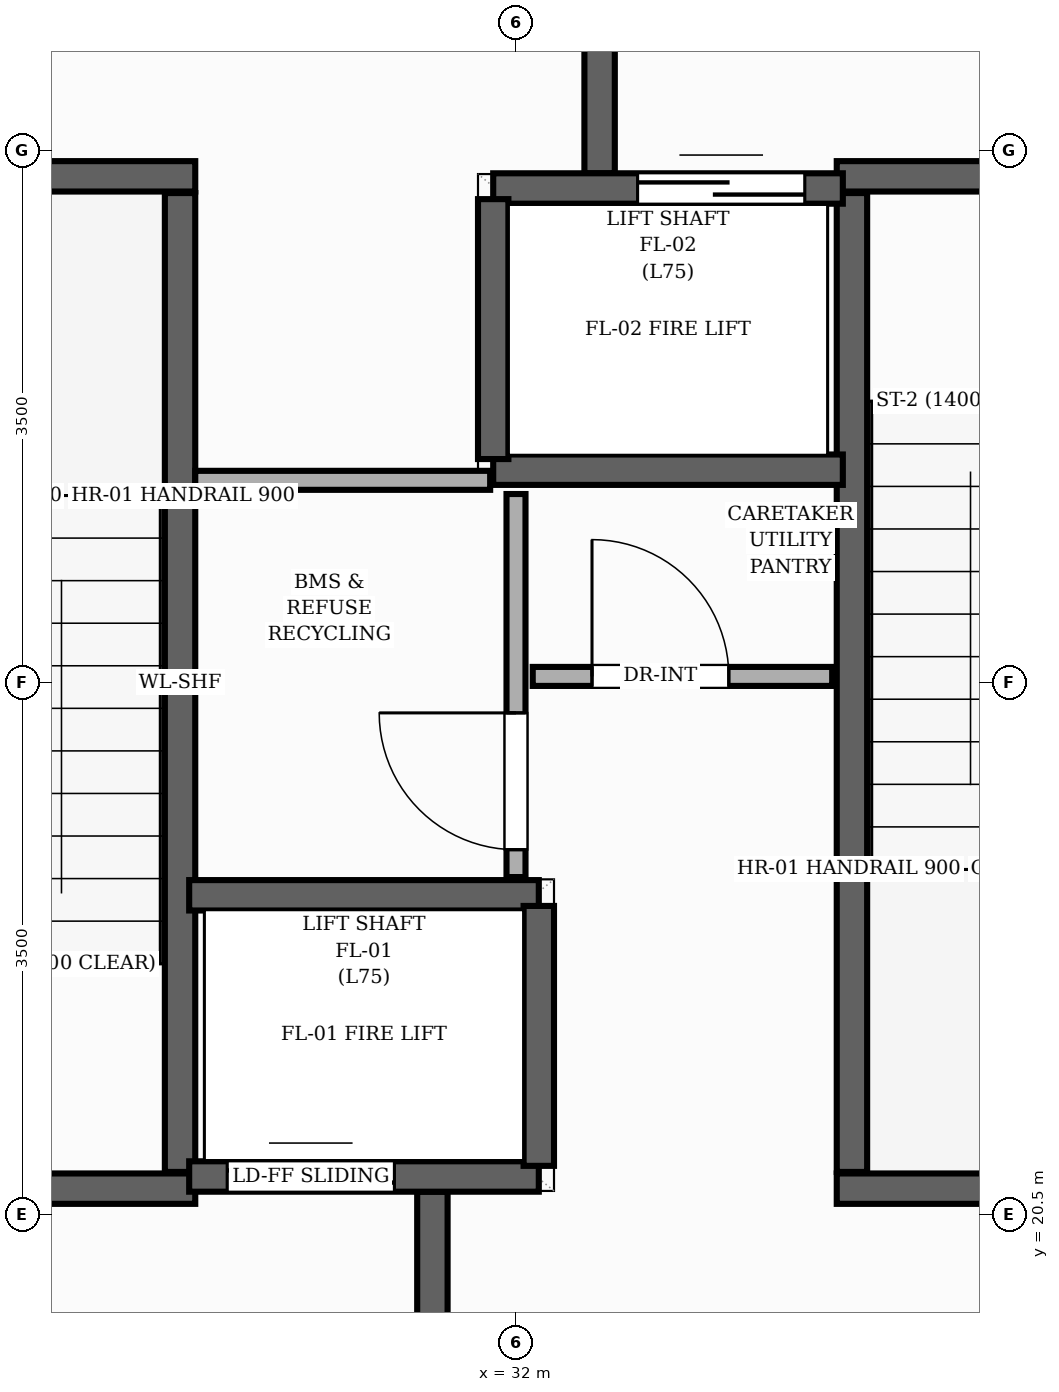
"""IFC4 building model, lengths in metres.
Left out: names, types, materials, properties, quantities, classifications, styles, units other than length and angle.
Written with IfcOpenShell. Run it as: python <this file> out.ifc"""

import sys

from ifc_helpers import new_model, si_unit, direction, frame, frame_2d, origin, place, context, subcontext, project, spatial, rectangle, extrude, element, fill, save


model = new_model("IFC4")
c1 = context("Model", 3, precision=1e-05, world=origin(), true_north=direction((0.0, 1.0)))
c2 = subcontext(c1, "Body", "Model", "MODEL_VIEW")
j1 = project(units=[si_unit("LENGTHUNIT", "METRE"), si_unit("PLANEANGLEUNIT", "RADIAN")], contexts=[c1])
p1 = place(None, origin())
s1 = spatial("IfcSite", under=j1, at=p1, CompositionType="ELEMENT")
p2 = place(p1, origin())
s2 = spatial("IfcBuilding", under=s1, at=p2, CompositionType="ELEMENT")
p3 = place(p2, frame((0.0, 0.0, 251.04)))
s3 = spatial("IfcBuildingStorey", under=s2, at=p3, CompositionType="ELEMENT", Elevation=251.04)
p4 = place(p3, frame((29.79, 20.78, 0.0), z_axis=(0.0, 0.0, 1.0), x_axis=(0.0, 1.0, 0.0)))
e1 = element("IfcWall", 1, at=p4, inside=s3, PredefinedType="SHEAR", context=c2, shape_type="SweptSolid", body=[
    extrude(rectangle(XDim=6.44, YDim=0.2, at=frame_2d((3.22, 0.0))), origin(), (0.0, 0.0, 1.0), 4.16),
])
p5 = place(p3, frame((26.65, 27.33, 0.0), z_axis=(0.0, 0.0, 1.0), x_axis=(1.0, 0.0, 0.0)))
e2 = element("IfcWall", 2, at=p5, inside=s3, PredefinedType="SHEAR", context=c2, shape_type="SweptSolid", body=[
    extrude(rectangle(XDim=3.24, YDim=0.2, at=frame_2d((1.62, 0.0))), origin(), (0.0, 0.0, 1.0), 4.16),
])
p6 = place(p3, frame((26.65, 20.67, 0.0), z_axis=(0.0, 0.0, 1.0), x_axis=(1.0, 0.0, 0.0)))
e3 = element("IfcWall", 3, at=p6, inside=s3, PredefinedType="SHEAR", context=c2, shape_type="SweptSolid", body=[
    extrude(rectangle(XDim=3.24, YDim=0.2, at=frame_2d((1.62, 0.0))), origin(), (0.0, 0.0, 1.0), 4.16),
])
p7 = place(p6, frame((1.055, 0.0, 0.0)))
e4 = element("IfcOpeningElement", 4, at=p7, cuts=e3, PredefinedType="OPENING", context=c2, shape_type="SweptSolid", body=[
    extrude(rectangle(XDim=1.05, YDim=2.15, at=frame_2d((0.525, 1.075))), frame((0.0, 0.11, 0.0), z_axis=(0.0, -1.0, 0.0), x_axis=(1.0, 0.0, 0.0)), (0.0, 0.0, 1.0), 0.22),
])
p8 = place(p3, frame((34.21, 20.78, 0.0), z_axis=(0.0, 0.0, 1.0), x_axis=(0.0, 1.0, 0.0)))
e5 = element("IfcWall", 5, at=p8, inside=s3, PredefinedType="SHEAR", context=c2, shape_type="SweptSolid", body=[
    extrude(rectangle(XDim=6.44, YDim=0.2, at=frame_2d((3.22, 0.0))), origin(), (0.0, 0.0, 1.0), 4.16),
])
p9 = place(p3, frame((34.11, 20.67, 0.0), z_axis=(0.0, 0.0, 1.0), x_axis=(1.0, 0.0, 0.0)))
e6 = element("IfcWall", 6, at=p9, inside=s3, PredefinedType="SHEAR", context=c2, shape_type="SweptSolid", body=[
    extrude(rectangle(XDim=3.24, YDim=0.2, at=frame_2d((1.62, 0.0))), origin(), (0.0, 0.0, 1.0), 4.16),
])
p10 = place(p3, frame((34.11, 27.33, 0.0), z_axis=(0.0, 0.0, 1.0), x_axis=(1.0, 0.0, 0.0)))
e7 = element("IfcWall", 7, at=p10, inside=s3, PredefinedType="SHEAR", context=c2, shape_type="SweptSolid", body=[
    extrude(rectangle(XDim=3.24, YDim=0.2, at=frame_2d((1.62, 0.0))), origin(), (0.0, 0.0, 1.0), 4.16),
])
p11 = place(p10, frame((1.135, 0.0, 0.0)))
e8 = element("IfcOpeningElement", 8, at=p11, cuts=e7, PredefinedType="OPENING", context=c2, shape_type="SweptSolid", body=[
    extrude(rectangle(XDim=1.05, YDim=2.15, at=frame_2d((0.525, 1.075))), frame((0.0, 0.11, 0.0), z_axis=(0.0, -1.0, 0.0), x_axis=(1.0, 0.0, 0.0)), (0.0, 0.0, 1.0), 0.22),
])
for number, where, z_axis, x_axis in (
    (9, (31.45, 17.15, 0.0), (0.0, 0.0, 1.0), (0.0, 1.0, 0.0)),
    (10, (32.55, 27.35, 0.0), (0.0, 0.0, 1.0), (0.0, 1.0, 0.0)),
):
    element("IfcWall", number, at=place(p3, frame(where, z_axis=z_axis, x_axis=x_axis)), inside=s3, PredefinedType="SHEAR", context=c2, shape_type="SweptSolid", body=[
        extrude(rectangle(XDim=3.5, YDim=0.2, at=frame_2d((1.75, 0.0))), origin(), (0.0, 0.0, 1.0), 4.16),
    ])
p12 = place(p3, frame((29.85, 20.75, 0.0), z_axis=(0.0, 0.0, 1.0), x_axis=(1.0, 0.0, 0.0)))
e11 = element("IfcWall", 11, at=p12, inside=s3, PredefinedType="SHEAR", context=c2, shape_type="SweptSolid", body=[
    extrude(rectangle(XDim=2.3, YDim=0.2, at=frame_2d((1.15, 0.0))), origin(), (0.0, 0.0, 1.0), 4.16),
])
p13 = place(p12, frame((0.25, 0.0, 0.0)))
e12 = element("IfcOpeningElement", 12, at=p13, cuts=e11, PredefinedType="OPENING", context=c2, shape_type="SweptSolid", body=[
    extrude(rectangle(XDim=1.1, YDim=2.15, at=frame_2d((0.55, 1.075))), frame((0.0, 0.11, 0.0), z_axis=(0.0, -1.0, 0.0), x_axis=(1.0, 0.0, 0.0)), (0.0, 0.0, 1.0), 0.22),
])
p14 = place(p3, frame((29.85, 22.6, 0.0), z_axis=(0.0, 0.0, 1.0), x_axis=(1.0, 0.0, 0.0)))
e13 = element("IfcWall", 13, at=p14, inside=s3, PredefinedType="SHEAR", context=c2, shape_type="SweptSolid", body=[
    extrude(rectangle(XDim=2.3, YDim=0.2, at=frame_2d((1.15, 0.0))), origin(), (0.0, 0.0, 1.0), 4.16),
])
p15 = place(p3, frame((32.15, 20.82, 0.0), z_axis=(0.0, 0.0, 1.0), x_axis=(0.0, 1.0, 0.0)))
e14 = element("IfcWall", 14, at=p15, inside=s3, PredefinedType="SHEAR", context=c2, shape_type="SweptSolid", body=[
    extrude(rectangle(XDim=1.71, YDim=0.2, at=frame_2d((0.855, 0.0))), origin(), (0.0, 0.0, 1.0), 4.16),
])
p16 = place(p3, frame((31.85, 27.25, 0.0), z_axis=(0.0, 0.0, 1.0), x_axis=(1.0, 0.0, 0.0)))
e15 = element("IfcWall", 15, at=p16, inside=s3, PredefinedType="SHEAR", context=c2, shape_type="SweptSolid", body=[
    extrude(rectangle(XDim=2.3, YDim=0.2, at=frame_2d((1.15, 0.0))), origin(), (0.0, 0.0, 1.0), 4.16),
])
p17 = place(p16, frame((0.95, 0.0, 0.0)))
e16 = element("IfcOpeningElement", 16, at=p17, cuts=e15, PredefinedType="OPENING", context=c2, shape_type="SweptSolid", body=[
    extrude(rectangle(XDim=1.1, YDim=2.15, at=frame_2d((0.55, 1.075))), frame((0.0, 0.11, 0.0), z_axis=(0.0, -1.0, 0.0), x_axis=(1.0, 0.0, 0.0)), (0.0, 0.0, 1.0), 0.22),
])
p18 = place(p3, frame((31.85, 25.4, 0.0), z_axis=(0.0, 0.0, 1.0), x_axis=(1.0, 0.0, 0.0)))
e17 = element("IfcWall", 17, at=p18, inside=s3, PredefinedType="SHEAR", context=c2, shape_type="SweptSolid", body=[
    extrude(rectangle(XDim=2.3, YDim=0.2, at=frame_2d((1.15, 0.0))), origin(), (0.0, 0.0, 1.0), 4.16),
])
p19 = place(p3, frame((31.85, 25.47, 0.0), z_axis=(0.0, 0.0, 1.0), x_axis=(0.0, 1.0, 0.0)))
e18 = element("IfcWall", 18, at=p19, inside=s3, PredefinedType="SHEAR", context=c2, shape_type="SweptSolid", body=[
    extrude(rectangle(XDim=1.71, YDim=0.2, at=frame_2d((0.855, 0.0))), origin(), (0.0, 0.0, 1.0), 4.16),
])
p20 = place(p3, frame((32.0, 22.72, 0.0), z_axis=(0.0, 0.0, 1.0), x_axis=(0.0, 1.0, 0.0)))
e19 = element("IfcWall", 19, at=p20, inside=s3, PredefinedType="PARTITIONING", context=c2, shape_type="SweptSolid", body=[
    extrude(rectangle(XDim=2.52, YDim=0.125, at=frame_2d((1.26, 0.0))), origin(), (0.0, 0.0, 1.0), 3.905),
])
p21 = place(p20, frame((0.18, 0.0, 0.0)))
e20 = element("IfcOpeningElement", 20, at=p21, cuts=e19, PredefinedType="OPENING", context=c2, shape_type="SweptSolid", body=[
    extrude(rectangle(XDim=0.9, YDim=2.1, at=frame_2d((0.45, 1.05))), frame((0.0, 0.073, 0.0), z_axis=(0.0, -1.0, 0.0), x_axis=(1.0, 0.0, 0.0)), (0.0, 0.0, 1.0), 0.145),
])
p22 = place(p3, frame((32.11, 24.04, 0.0), z_axis=(0.0, 0.0, 1.0), x_axis=(1.0, 0.0, 0.0)))
e21 = element("IfcWall", 21, at=p22, inside=s3, PredefinedType="PARTITIONING", context=c2, shape_type="SweptSolid", body=[
    extrude(rectangle(XDim=1.97, YDim=0.125, at=frame_2d((0.985, 0.0))), origin(), (0.0, 0.0, 1.0), 3.905),
])
p23 = place(p22, frame((0.39, 0.0, 0.0)))
e22 = element("IfcOpeningElement", 22, at=p23, cuts=e21, PredefinedType="OPENING", context=c2, shape_type="SweptSolid", body=[
    extrude(rectangle(XDim=0.9, YDim=2.1, at=frame_2d((0.45, 1.05))), frame((0.0, 0.073, 0.0), z_axis=(0.0, -1.0, 0.0), x_axis=(1.0, 0.0, 0.0)), (0.0, 0.0, 1.0), 0.145),
])
p24 = place(p3, frame((29.89, 25.33, 0.0), z_axis=(0.0, 0.0, 1.0), x_axis=(1.0, 0.0, 0.0)))
e23 = element("IfcWall", 23, at=p24, inside=s3, PredefinedType="PARTITIONING", context=c2, shape_type="SweptSolid", body=[
    extrude(rectangle(XDim=1.94, YDim=0.125, at=frame_2d((0.97, 0.0))), origin(), (0.0, 0.0, 1.0), 3.905),
])
p25 = place(p13, origin())
e24 = element("IfcDoor", 24, at=p25, inside=s3, OperationType="DOUBLE_DOOR_SLIDING", PredefinedType="DOOR", context=c2, shape_type="SweptSolid", body=[
    extrude(rectangle(XDim=1.1, YDim=2.15, at=frame_2d((0.55, 1.075))), frame((0.0, 0.025, 0.0), z_axis=(0.0, -1.0, 0.0), x_axis=(1.0, 0.0, 0.0)), (0.0, 0.0, 1.0), 0.05),
])
fill(e12, e24)
p26 = place(p17, origin())
e25 = element("IfcDoor", 25, at=p26, inside=s3, OperationType="DOUBLE_DOOR_SLIDING", PredefinedType="DOOR", context=c2, shape_type="SweptSolid", body=[
    extrude(rectangle(XDim=1.1, YDim=2.15, at=frame_2d((0.55, 1.075))), frame((0.0, 0.025, 0.0), z_axis=(0.0, -1.0, 0.0), x_axis=(1.0, 0.0, 0.0)), (0.0, 0.0, 1.0), 0.05),
])
fill(e16, e25)
p27 = place(p23, origin())
e26 = element("IfcDoor", 26, at=p27, inside=s3, OperationType="SINGLE_SWING_LEFT", PredefinedType="DOOR", context=c2, shape_type="SweptSolid", body=[
    extrude(rectangle(XDim=0.9, YDim=2.1, at=frame_2d((0.45, 1.05))), frame((0.0, 0.025, 0.0), z_axis=(0.0, -1.0, 0.0), x_axis=(1.0, 0.0, 0.0)), (0.0, 0.0, 1.0), 0.05),
])
fill(e22, e26)
p28 = place(p21, origin())
e27 = element("IfcDoor", 27, at=p28, inside=s3, OperationType="SINGLE_SWING_RIGHT", PredefinedType="DOOR", context=c2, shape_type="SweptSolid", body=[
    extrude(rectangle(XDim=0.9, YDim=2.1, at=frame_2d((0.45, 1.05))), frame((0.0, 0.025, 0.0), z_axis=(0.0, -1.0, 0.0), x_axis=(1.0, 0.0, 0.0)), (0.0, 0.0, 1.0), 0.05),
])
fill(e20, e27)
save(model, sys.argv[1])
